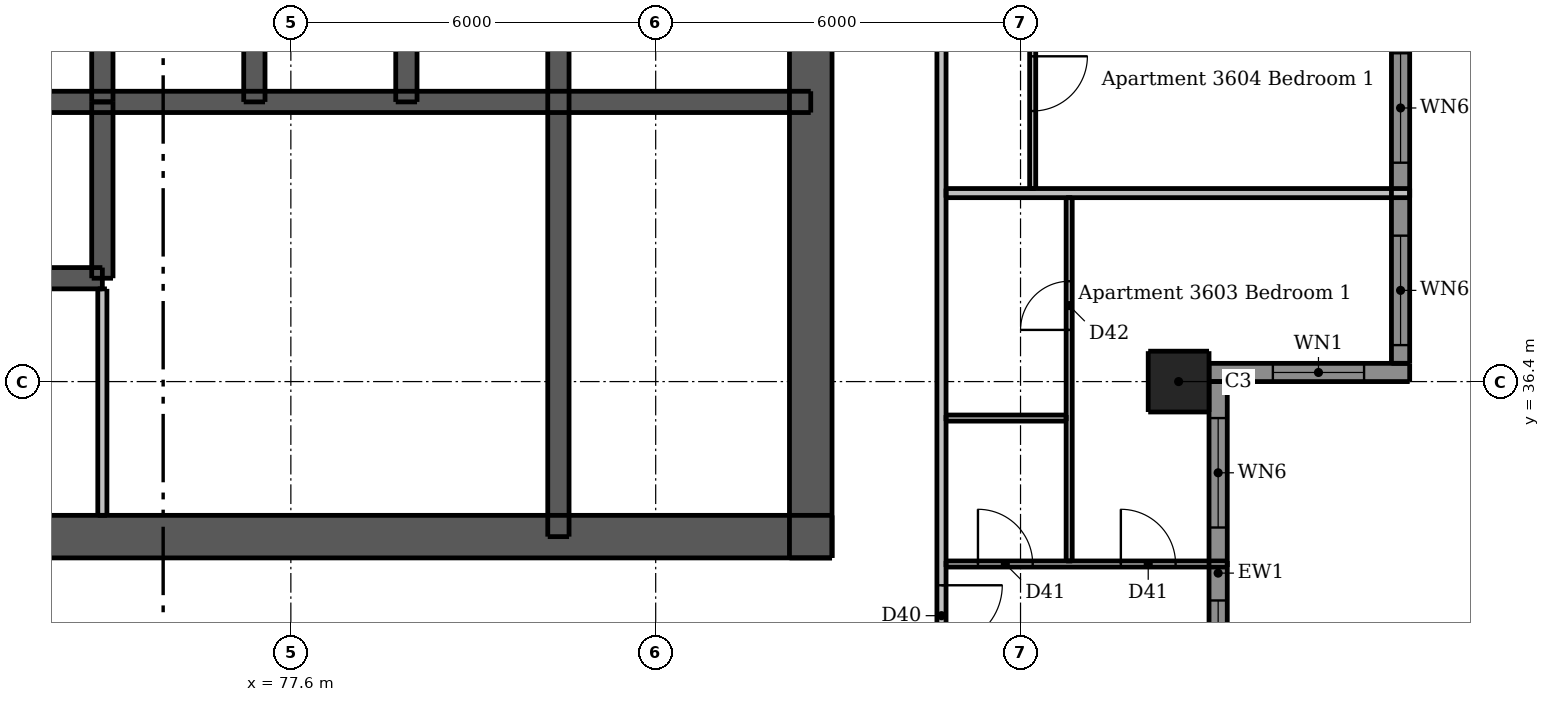
"""IFC4 building model, lengths in metres.
Left out: names, types, materials, properties, quantities, classifications, styles, units other than length and angle.
Written with IfcOpenShell. Run it as: python <this file> out.ifc"""

import sys

from ifc_helpers import new_model, si_unit, direction, frame, frame_2d, origin, origin_2d, place, context, subcontext, project, spatial, rectangle, extrude, element, fill, save


model = new_model("IFC4")
c1 = context("Model", 3, precision=1e-05, world=origin(), true_north=direction((0.0, 1.0)))
c2 = subcontext(c1, "Body", "Model", "MODEL_VIEW")
j1 = project(units=[si_unit("LENGTHUNIT", "METRE"), si_unit("PLANEANGLEUNIT", "RADIAN")], contexts=[c1])
p1 = place(None, origin())
s1 = spatial("IfcSite", under=j1, at=p1, CompositionType="ELEMENT")
p2 = place(p1, origin())
s2 = spatial("IfcBuilding", under=s1, at=p2, CompositionType="ELEMENT")
p3 = place(p2, frame((0.0, 0.0, 137.2)))
s3 = spatial("IfcBuildingStorey", under=s2, at=p3, CompositionType="ELEMENT", Elevation=137.2)
p4 = place(p3, frame((62.5, 33.85, 0.0), z_axis=(0.0, 0.0, 1.0), x_axis=(1.0, 0.0, 0.0)))
e1 = element("IfcWall", 1, at=p4, inside=s3, PredefinedType="SHEAR", context=c2, shape_type="SweptSolid", body=[
    extrude(rectangle(XDim=24.0, YDim=0.7, at=frame_2d((12.0, 0.0))), origin(), (0.0, 0.0, 1.0), 3.05),
])
p5 = place(p4, frame((1.962, 0.0, 0.0)))
e2 = element("IfcOpeningElement", 2, at=p5, cuts=e1, PredefinedType="OPENING", context=c2, shape_type="SweptSolid", body=[
    extrude(rectangle(XDim=1.1, YDim=2.1, at=frame_2d((0.55, 1.05))), frame((0.0, 0.36, 0.0), z_axis=(0.0, -1.0, 0.0), x_axis=(1.0, 0.0, 0.0)), (0.0, 0.0, 1.0), 0.72),
])
p6 = place(p4, frame((20.938, 0.0, 0.0)))
e3 = element("IfcOpeningElement", 3, at=p6, cuts=e1, PredefinedType="OPENING", context=c2, shape_type="SweptSolid", body=[
    extrude(rectangle(XDim=1.1, YDim=2.1, at=frame_2d((0.55, 1.05))), frame((0.0, 0.36, 0.0), z_axis=(0.0, -1.0, 0.0), x_axis=(1.0, 0.0, 0.0)), (0.0, 0.0, 1.0), 0.72),
])
p7 = place(p4, frame((8.0, 0.0, 0.0)))
e4 = element("IfcOpeningElement", 4, at=p7, cuts=e1, PredefinedType="OPENING", context=c2, shape_type="SweptSolid", body=[
    extrude(rectangle(XDim=1.1, YDim=2.1, at=frame_2d((0.55, 1.05))), frame((0.0, 0.36, 0.0), z_axis=(0.0, -1.0, 0.0), x_axis=(1.0, 0.0, 0.0)), (0.0, 0.0, 1.0), 0.72),
])
p8 = place(p4, frame((15.3, 0.0, 0.0)))
e5 = element("IfcOpeningElement", 5, at=p8, cuts=e1, PredefinedType="OPENING", context=c2, shape_type="SweptSolid", body=[
    extrude(rectangle(XDim=0.9, YDim=2.1, at=frame_2d((0.45, 1.05))), frame((0.0, 0.36, 0.0), z_axis=(0.0, -1.0, 0.0), x_axis=(1.0, 0.0, 0.0)), (0.0, 0.0, 1.0), 0.72),
])
p9 = place(p3, frame((86.15, 33.5, 0.0), z_axis=(0.0, 0.0, 1.0), x_axis=(0.0, 1.0, 0.0)))
e6 = element("IfcWall", 6, at=p9, inside=s3, PredefinedType="SHEAR", context=c2, shape_type="SweptSolid", body=[
    extrude(rectangle(XDim=24.0, YDim=0.7, at=frame_2d((12.0, 0.0))), origin(), (0.0, 0.0, 1.0), 3.05),
])
p10 = place(p9, frame((11.2, 0.0, 0.0)))
e7 = element("IfcOpeningElement", 7, at=p10, cuts=e6, PredefinedType="OPENING", context=c2, shape_type="SweptSolid", body=[
    extrude(rectangle(XDim=1.6, YDim=2.1, at=frame_2d((0.8, 1.05))), frame((0.0, 0.36, 0.0), z_axis=(0.0, -1.0, 0.0), x_axis=(1.0, 0.0, 0.0)), (0.0, 0.0, 1.0), 0.72),
])
p11 = place(p3, frame((62.85, 41.0, 0.0), z_axis=(0.0, 0.0, 1.0), x_axis=(1.0, 0.0, 0.0)))
e8 = element("IfcWall", 8, at=p11, inside=s3, PredefinedType="SHEAR", context=c2, shape_type="SweptSolid", body=[
    extrude(rectangle(XDim=23.3, YDim=0.35, at=frame_2d((11.65, 0.0))), origin(), (0.0, 0.0, 1.0), 3.05),
])
p12 = place(p3, frame((82.0, 33.85, 0.0), z_axis=(0.0, 0.0, 1.0), x_axis=(0.0, 1.0, 0.0)))
e9 = element("IfcWall", 9, at=p12, inside=s3, PredefinedType="SHEAR", context=c2, shape_type="SweptSolid", body=[
    extrude(rectangle(XDim=10.05, YDim=0.35, at=frame_2d((5.025, 0.0))), origin(), (0.0, 0.0, 1.0), 3.05),
])
for number, where, z_axis, x_axis in (
    (10, (74.5, 41.0, 0.0), (0.0, 0.0, 1.0), (0.0, 1.0, 0.0)),
    (11, (77.0, 41.0, 0.0), (0.0, 0.0, 1.0), (0.0, 1.0, 0.0)),
    (12, (79.5, 41.0, 0.0), (0.0, 0.0, 1.0), (0.0, 1.0, 0.0)),
):
    element("IfcWall", number, at=place(p3, frame(where, z_axis=z_axis, x_axis=x_axis)), inside=s3, PredefinedType="SHEAR", context=c2, shape_type="SweptSolid", body=[
        extrude(rectangle(XDim=2.9, YDim=0.35, at=frame_2d((1.45, 0.0))), origin(), (0.0, 0.0, 1.0), 3.05),
    ])
p13 = place(p3, frame((67.0, 38.1, 0.0), z_axis=(0.0, 0.0, 1.0), x_axis=(1.0, 0.0, 0.0)))
e13 = element("IfcWall", 13, at=p13, inside=s3, PredefinedType="SHEAR", context=c2, shape_type="SweptSolid", body=[
    extrude(rectangle(XDim=7.5, YDim=0.35, at=frame_2d((3.75, 0.0))), origin(), (0.0, 0.0, 1.0), 3.05),
])
p14 = place(p13, frame((0.7, 0.0, 0.0)))
e14 = element("IfcOpeningElement", 14, at=p14, cuts=e13, PredefinedType="OPENING", context=c2, shape_type="SweptSolid", body=[
    extrude(rectangle(XDim=1.1, YDim=2.1, at=frame_2d((0.55, 1.05))), frame((0.0, 0.185, 0.0), z_axis=(0.0, -1.0, 0.0), x_axis=(1.0, 0.0, 0.0)), (0.0, 0.0, 1.0), 0.37),
])
p15 = place(p13, frame((3.2, 0.0, 0.0)))
e15 = element("IfcOpeningElement", 15, at=p15, cuts=e13, PredefinedType="OPENING", context=c2, shape_type="SweptSolid", body=[
    extrude(rectangle(XDim=1.1, YDim=2.1, at=frame_2d((0.55, 1.05))), frame((0.0, 0.185, 0.0), z_axis=(0.0, -1.0, 0.0), x_axis=(1.0, 0.0, 0.0)), (0.0, 0.0, 1.0), 0.37),
])
p16 = place(p13, frame((5.65, 0.0, 0.0)))
e16 = element("IfcOpeningElement", 16, at=p16, cuts=e13, PredefinedType="OPENING", context=c2, shape_type="SweptSolid", body=[
    extrude(rectangle(XDim=1.2, YDim=2.1, at=frame_2d((0.6, 1.05))), frame((0.0, 0.185, 0.0), z_axis=(0.0, -1.0, 0.0), x_axis=(1.0, 0.0, 0.0)), (0.0, 0.0, 1.0), 0.37),
])
p17 = place(p3, frame((74.5, 38.1, 0.0), z_axis=(0.0, 0.0, 1.0), x_axis=(0.0, 1.0, 0.0)))
e17 = element("IfcWall", 17, at=p17, inside=s3, PredefinedType="SHEAR", context=c2, shape_type="SweptSolid", body=[
    extrude(rectangle(XDim=2.9, YDim=0.35, at=frame_2d((1.45, 0.0))), origin(), (0.0, 0.0, 1.0), 3.05),
])
p18 = place(p3, frame((92.2, 36.4, 0.0), z_axis=(0.0, 0.0, 1.0), x_axis=(1.0, 0.0, 0.0)))
e18 = element("IfcColumn", 18, at=p18, inside=s3, PredefinedType="COLUMN", context=c2, shape_type="SweptSolid", body=[
    extrude(rectangle(XDim=1.0, YDim=1.0, at=origin_2d()), origin(), (0.0, 0.0, 1.0), 3.05),
])
p19 = place(p3, frame((92.7, 36.55, 0.0), z_axis=(0.0, 0.0, 1.0), x_axis=(1.0, 0.0, 0.0)))
e19 = element("IfcWall", 19, at=p19, inside=s3, PredefinedType="SOLIDWALL", context=c2, shape_type="SweptSolid", body=[
    extrude(rectangle(XDim=3.3, YDim=0.3, at=frame_2d((1.65, 0.0))), origin(), (0.0, 0.0, 1.0), 3.05),
])
p20 = place(p19, frame((1.05, 0.0, 0.9)))
e20 = element("IfcOpeningElement", 20, at=p20, cuts=e19, PredefinedType="OPENING", context=c2, shape_type="SweptSolid", body=[
    extrude(rectangle(XDim=1.5, YDim=1.5, at=frame_2d((0.75, 0.75))), frame((0.0, 0.16, 0.0), z_axis=(0.0, -1.0, 0.0), x_axis=(1.0, 0.0, 0.0)), (0.0, 0.0, 1.0), 0.32),
])
p21 = place(p3, frame((92.85, 30.1, 0.0), z_axis=(0.0, 0.0, 1.0), x_axis=(0.0, 1.0, 0.0)))
e21 = element("IfcWall", 21, at=p21, inside=s3, PredefinedType="SOLIDWALL", context=c2, shape_type="SweptSolid", body=[
    extrude(rectangle(XDim=6.3, YDim=0.3, at=frame_2d((3.15, 0.0))), origin(), (0.0, 0.0, 1.0), 3.05),
])
p22 = place(p21, frame((0.9, 0.0, 0.15)))
e22 = element("IfcOpeningElement", 22, at=p22, cuts=e21, PredefinedType="OPENING", context=c2, shape_type="SweptSolid", body=[
    extrude(rectangle(XDim=1.8, YDim=2.1, at=frame_2d((0.9, 1.05))), frame((0.0, 0.16, 0.0), z_axis=(0.0, -1.0, 0.0), x_axis=(1.0, 0.0, 0.0)), (0.0, 0.0, 1.0), 0.32),
])
p23 = place(p21, frame((3.9, 0.0, 0.15)))
e23 = element("IfcOpeningElement", 23, at=p23, cuts=e21, PredefinedType="OPENING", context=c2, shape_type="SweptSolid", body=[
    extrude(rectangle(XDim=1.8, YDim=2.1, at=frame_2d((0.9, 1.05))), frame((0.0, 0.16, 0.0), z_axis=(0.0, -1.0, 0.0), x_axis=(1.0, 0.0, 0.0)), (0.0, 0.0, 1.0), 0.32),
])
p24 = place(p3, frame((95.85, 36.7, 0.0), z_axis=(0.0, 0.0, 1.0), x_axis=(0.0, 1.0, 0.0)))
e24 = element("IfcWall", 24, at=p24, inside=s3, PredefinedType="SOLIDWALL", context=c2, shape_type="SweptSolid", body=[
    extrude(rectangle(XDim=5.7, YDim=0.3, at=frame_2d((2.85, 0.0))), origin(), (0.0, 0.0, 1.0), 3.05),
])
p25 = place(p24, frame((0.3, 0.0, 0.15)))
e25 = element("IfcOpeningElement", 25, at=p25, cuts=e24, PredefinedType="OPENING", context=c2, shape_type="SweptSolid", body=[
    extrude(rectangle(XDim=1.8, YDim=2.1, at=frame_2d((0.9, 1.05))), frame((0.0, 0.16, 0.0), z_axis=(0.0, -1.0, 0.0), x_axis=(1.0, 0.0, 0.0)), (0.0, 0.0, 1.0), 0.32),
])
p26 = place(p24, frame((3.3, 0.0, 0.15)))
e26 = element("IfcOpeningElement", 26, at=p26, cuts=e24, PredefinedType="OPENING", context=c2, shape_type="SweptSolid", body=[
    extrude(rectangle(XDim=1.8, YDim=2.1, at=frame_2d((0.9, 1.05))), frame((0.0, 0.16, 0.0), z_axis=(0.0, -1.0, 0.0), x_axis=(1.0, 0.0, 0.0)), (0.0, 0.0, 1.0), 0.32),
])
p27 = place(p3, frame((74.5, 34.2, 0.0), z_axis=(0.0, 0.0, 1.0), x_axis=(0.0, 1.0, 0.0)))
e27 = element("IfcWall", 27, at=p27, inside=s3, PredefinedType="PLUMBINGWALL", context=c2, shape_type="SweptSolid", body=[
    extrude(rectangle(XDim=3.725, YDim=0.15, at=frame_2d((1.863, 0.0))), origin(), (0.0, 0.0, 1.0), 3.05),
])
p28 = place(p3, frame((89.8, 59.35, 0.0), z_axis=(0.0, 0.0, 1.0), x_axis=(0.0, -1.0, 0.0)))
e28 = element("IfcWall", 28, at=p28, inside=s3, PredefinedType="PARTITIONING", context=c2, shape_type="SweptSolid", body=[
    extrude(rectangle(XDim=19.775, YDim=0.1, at=frame_2d((9.888, 0.0))), origin(), (0.0, 0.0, 1.0), 3.05),
])
p29 = place(p28, frame((2.7, 0.0, 0.0)))
e29 = element("IfcOpeningElement", 29, at=p29, cuts=e28, PredefinedType="OPENING", context=c2, shape_type="SweptSolid", body=[
    extrude(rectangle(XDim=0.9, YDim=2.1, at=frame_2d((0.45, 1.05))), frame((0.0, 0.06, 0.0), z_axis=(0.0, -1.0, 0.0), x_axis=(1.0, 0.0, 0.0)), (0.0, 0.0, 1.0), 0.12),
])
p30 = place(p28, frame((17.6, 0.0, 0.0)))
e30 = element("IfcOpeningElement", 30, at=p30, cuts=e28, PredefinedType="OPENING", context=c2, shape_type="SweptSolid", body=[
    extrude(rectangle(XDim=0.9, YDim=2.1, at=frame_2d((0.45, 1.05))), frame((0.0, 0.06, 0.0), z_axis=(0.0, -1.0, 0.0), x_axis=(1.0, 0.0, 0.0)), (0.0, 0.0, 1.0), 0.12),
])
p31 = place(p28, frame((10.15, 0.0, 0.0)))
e31 = element("IfcOpeningElement", 31, at=p31, cuts=e28, PredefinedType="OPENING", context=c2, shape_type="SweptSolid", body=[
    extrude(rectangle(XDim=0.9, YDim=2.1, at=frame_2d((0.45, 1.05))), frame((0.0, 0.06, 0.0), z_axis=(0.0, -1.0, 0.0), x_axis=(1.0, 0.0, 0.0)), (0.0, 0.0, 1.0), 0.12),
])
p32 = place(p28, frame((14.65, 0.0, 0.0)))
e32 = element("IfcOpeningElement", 32, at=p32, cuts=e28, PredefinedType="OPENING", context=c2, shape_type="SweptSolid", body=[
    extrude(rectangle(XDim=0.8, YDim=2.1, at=frame_2d((0.4, 1.05))), frame((0.0, 0.06, 0.0), z_axis=(0.0, -1.0, 0.0), x_axis=(1.0, 0.0, 0.0)), (0.0, 0.0, 1.0), 0.12),
])
p33 = place(p28, frame((5.75, 0.0, 0.0)))
e33 = element("IfcOpeningElement", 33, at=p33, cuts=e28, PredefinedType="OPENING", context=c2, shape_type="SweptSolid", body=[
    extrude(rectangle(XDim=0.8, YDim=2.1, at=frame_2d((0.4, 1.05))), frame((0.0, 0.06, 0.0), z_axis=(0.0, -1.0, 0.0), x_axis=(1.0, 0.0, 0.0)), (0.0, 0.0, 1.0), 0.12),
])
p34 = place(p3, frame((90.4, 33.45, 0.0), z_axis=(0.0, 0.0, 1.0), x_axis=(0.0, 1.0, 0.0)))
e34 = element("IfcWall", 34, at=p34, inside=s3, PredefinedType="PARTITIONING", context=c2, shape_type="SweptSolid", body=[
    extrude(rectangle(XDim=5.975, YDim=0.1, at=frame_2d((2.988, 0.0))), origin(), (0.0, 0.0, 1.0), 3.05),
])
p35 = place(p34, frame((3.8, 0.0, 0.0)))
e35 = element("IfcOpeningElement", 35, at=p35, cuts=e34, PredefinedType="OPENING", context=c2, shape_type="SweptSolid", body=[
    extrude(rectangle(XDim=0.8, YDim=2.1, at=frame_2d((0.4, 1.05))), frame((0.0, 0.06, 0.0), z_axis=(0.0, -1.0, 0.0), x_axis=(1.0, 0.0, 0.0)), (0.0, 0.0, 1.0), 0.12),
])
p36 = place(p3, frame((88.375, 35.8, 0.0), z_axis=(0.0, 0.0, 1.0), x_axis=(1.0, 0.0, 0.0)))
e36 = element("IfcWall", 36, at=p36, inside=s3, PredefinedType="PARTITIONING", context=c2, shape_type="SweptSolid", body=[
    extrude(rectangle(XDim=1.975, YDim=0.1, at=frame_2d((0.988, 0.0))), origin(), (0.0, 0.0, 1.0), 3.05),
])
p37 = place(p3, frame((88.375, 33.4, 0.0), z_axis=(0.0, 0.0, 1.0), x_axis=(1.0, 0.0, 0.0)))
e37 = element("IfcWall", 37, at=p37, inside=s3, PredefinedType="PARTITIONING", context=c2, shape_type="SweptSolid", body=[
    extrude(rectangle(XDim=4.625, YDim=0.1, at=frame_2d((2.312, 0.0))), origin(), (0.0, 0.0, 1.0), 3.05),
])
p38 = place(p37, frame((0.525, 0.0, 0.0)))
e38 = element("IfcOpeningElement", 38, at=p38, cuts=e37, PredefinedType="OPENING", context=c2, shape_type="SweptSolid", body=[
    extrude(rectangle(XDim=0.9, YDim=2.1, at=frame_2d((0.45, 1.05))), frame((0.0, 0.06, 0.0), z_axis=(0.0, -1.0, 0.0), x_axis=(1.0, 0.0, 0.0)), (0.0, 0.0, 1.0), 0.12),
])
p39 = place(p37, frame((2.875, 0.0, 0.0)))
e39 = element("IfcOpeningElement", 39, at=p39, cuts=e37, PredefinedType="OPENING", context=c2, shape_type="SweptSolid", body=[
    extrude(rectangle(XDim=0.9, YDim=2.1, at=frame_2d((0.45, 1.05))), frame((0.0, 0.06, 0.0), z_axis=(0.0, -1.0, 0.0), x_axis=(1.0, 0.0, 0.0)), (0.0, 0.0, 1.0), 0.12),
])
p40 = place(p3, frame((88.3, 60.475, 0.0), z_axis=(0.0, 0.0, 1.0), x_axis=(0.0, -1.0, 0.0)))
e40 = element("IfcWall", 40, at=p40, inside=s3, PredefinedType="PARTITIONING", context=c2, shape_type="SweptSolid", body=[
    extrude(rectangle(XDim=28.7, YDim=0.15, at=frame_2d((14.35, 0.0))), origin(), (0.0, 0.0, 1.0), 3.05),
])
p41 = place(p40, frame((27.425, 0.0, 0.0)))
e41 = element("IfcOpeningElement", 41, at=p41, cuts=e40, PredefinedType="OPENING", context=c2, shape_type="SweptSolid", body=[
    extrude(rectangle(XDim=1.0, YDim=2.1, at=frame_2d((0.5, 1.05))), frame((0.0, 0.085, 0.0), z_axis=(0.0, -1.0, 0.0), x_axis=(1.0, 0.0, 0.0)), (0.0, 0.0, 1.0), 0.17),
])
p42 = place(p40, frame((10.575, 0.0, 0.0)))
e42 = element("IfcOpeningElement", 42, at=p42, cuts=e40, PredefinedType="OPENING", context=c2, shape_type="SweptSolid", body=[
    extrude(rectangle(XDim=1.0, YDim=2.1, at=frame_2d((0.5, 1.05))), frame((0.0, 0.085, 0.0), z_axis=(0.0, -1.0, 0.0), x_axis=(1.0, 0.0, 0.0)), (0.0, 0.0, 1.0), 0.17),
])
p43 = place(p3, frame((88.375, 39.5, 0.0), z_axis=(0.0, 0.0, 1.0), x_axis=(1.0, 0.0, 0.0)))
e43 = element("IfcWall", 43, at=p43, inside=s3, PredefinedType="PARTITIONING", context=c2, shape_type="SweptSolid", body=[
    extrude(rectangle(XDim=7.625, YDim=0.15, at=frame_2d((3.812, 0.0))), origin(), (0.0, 0.0, 1.0), 3.05),
])
p44 = place(p20, origin())
e44 = element("IfcWindow", 44, at=p44, inside=s3, PartitioningType="DOUBLE_PANEL_VERTICAL", PredefinedType="WINDOW", context=c2, shape_type="SweptSolid", body=[
    extrude(rectangle(XDim=1.5, YDim=1.5, at=frame_2d((0.75, 0.75))), frame((0.0, 0.03, 0.0), z_axis=(0.0, -1.0, 0.0), x_axis=(1.0, 0.0, 0.0)), (0.0, 0.0, 1.0), 0.06),
])
fill(e20, e44)
p45 = place(p22, origin())
e45 = element("IfcWindow", 45, at=p45, inside=s3, PartitioningType="DOUBLE_PANEL_VERTICAL", PredefinedType="WINDOW", context=c2, shape_type="SweptSolid", body=[
    extrude(rectangle(XDim=1.8, YDim=2.1, at=frame_2d((0.9, 1.05))), frame((0.0, 0.03, 0.0), z_axis=(0.0, -1.0, 0.0), x_axis=(1.0, 0.0, 0.0)), (0.0, 0.0, 1.0), 0.06),
])
fill(e22, e45)
p46 = place(p23, origin())
e46 = element("IfcWindow", 46, at=p46, inside=s3, PartitioningType="DOUBLE_PANEL_VERTICAL", PredefinedType="WINDOW", context=c2, shape_type="SweptSolid", body=[
    extrude(rectangle(XDim=1.8, YDim=2.1, at=frame_2d((0.9, 1.05))), frame((0.0, 0.03, 0.0), z_axis=(0.0, -1.0, 0.0), x_axis=(1.0, 0.0, 0.0)), (0.0, 0.0, 1.0), 0.06),
])
fill(e23, e46)
p47 = place(p25, origin())
e47 = element("IfcWindow", 47, at=p47, inside=s3, PartitioningType="DOUBLE_PANEL_VERTICAL", PredefinedType="WINDOW", context=c2, shape_type="SweptSolid", body=[
    extrude(rectangle(XDim=1.8, YDim=2.1, at=frame_2d((0.9, 1.05))), frame((0.0, 0.03, 0.0), z_axis=(0.0, -1.0, 0.0), x_axis=(1.0, 0.0, 0.0)), (0.0, 0.0, 1.0), 0.06),
])
fill(e25, e47)
p48 = place(p26, origin())
e48 = element("IfcWindow", 48, at=p48, inside=s3, PartitioningType="DOUBLE_PANEL_VERTICAL", PredefinedType="WINDOW", context=c2, shape_type="SweptSolid", body=[
    extrude(rectangle(XDim=1.8, YDim=2.1, at=frame_2d((0.9, 1.05))), frame((0.0, 0.03, 0.0), z_axis=(0.0, -1.0, 0.0), x_axis=(1.0, 0.0, 0.0)), (0.0, 0.0, 1.0), 0.06),
])
fill(e26, e48)
p49 = place(p6, origin())
e49 = element("IfcDoor", 49, at=p49, inside=s3, OperationType="SINGLE_SWING_RIGHT", PredefinedType="DOOR", context=c2, shape_type="SweptSolid", body=[
    extrude(rectangle(XDim=1.1, YDim=2.1, at=frame_2d((0.55, 1.05))), frame((0.0, 0.337, 0.0), z_axis=(0.0, -1.0, 0.0), x_axis=(1.0, 0.0, 0.0)), (0.0, 0.0, 1.0), 0.05),
])
fill(e3, e49)
p50 = place(p8, origin())
e50 = element("IfcDoor", 50, at=p50, inside=s3, OperationType="SINGLE_SWING_LEFT", PredefinedType="DOOR", context=c2, shape_type="SweptSolid", body=[
    extrude(rectangle(XDim=0.9, YDim=2.1, at=frame_2d((0.45, 1.05))), frame((0.0, 0.337, 0.0), z_axis=(0.0, -1.0, 0.0), x_axis=(1.0, 0.0, 0.0)), (0.0, 0.0, 1.0), 0.05),
])
fill(e5, e50)
p51 = place(p16, origin())
e51 = element("IfcDoor", 51, at=p51, inside=s3, OperationType="DOUBLE_DOOR_SLIDING", PredefinedType="DOOR", context=c2, shape_type="SweptSolid", body=[
    extrude(rectangle(XDim=1.2, YDim=2.1, at=frame_2d((0.6, 1.05))), frame((0.0, 0.025, 0.0), z_axis=(0.0, -1.0, 0.0), x_axis=(1.0, 0.0, 0.0)), (0.0, 0.0, 1.0), 0.05),
])
fill(e16, e51)
p52 = place(p41, origin())
e52 = element("IfcDoor", 52, at=p52, inside=s3, OperationType="SINGLE_SWING_LEFT", PredefinedType="DOOR", context=c2, shape_type="SweptSolid", body=[
    extrude(rectangle(XDim=1.0, YDim=2.1, at=frame_2d((0.5, 1.05))), frame((0.0, 0.025, 0.0), z_axis=(0.0, -1.0, 0.0), x_axis=(1.0, 0.0, 0.0)), (0.0, 0.0, 1.0), 0.05),
])
fill(e41, e52)
p53 = place(p38, origin())
e53 = element("IfcDoor", 53, at=p53, inside=s3, OperationType="SINGLE_SWING_LEFT", PredefinedType="DOOR", context=c2, shape_type="SweptSolid", body=[
    extrude(rectangle(XDim=0.9, YDim=2.1, at=frame_2d((0.45, 1.05))), frame((0.0, 0.025, 0.0), z_axis=(0.0, -1.0, 0.0), x_axis=(1.0, 0.0, 0.0)), (0.0, 0.0, 1.0), 0.05),
])
fill(e38, e53)
p54 = place(p39, origin())
e54 = element("IfcDoor", 54, at=p54, inside=s3, OperationType="SINGLE_SWING_LEFT", PredefinedType="DOOR", context=c2, shape_type="SweptSolid", body=[
    extrude(rectangle(XDim=0.9, YDim=2.1, at=frame_2d((0.45, 1.05))), frame((0.0, 0.025, 0.0), z_axis=(0.0, -1.0, 0.0), x_axis=(1.0, 0.0, 0.0)), (0.0, 0.0, 1.0), 0.05),
])
fill(e39, e54)
p55 = place(p35, origin())
e55 = element("IfcDoor", 55, at=p55, inside=s3, OperationType="SINGLE_SWING_LEFT", PredefinedType="DOOR", context=c2, shape_type="SweptSolid", body=[
    extrude(rectangle(XDim=0.8, YDim=2.1, at=frame_2d((0.4, 1.05))), frame((0.0, 0.025, 0.0), z_axis=(0.0, -1.0, 0.0), x_axis=(1.0, 0.0, 0.0)), (0.0, 0.0, 1.0), 0.05),
])
fill(e35, e55)
p56 = place(p30, origin())
e56 = element("IfcDoor", 56, at=p56, inside=s3, OperationType="SINGLE_SWING_LEFT", PredefinedType="DOOR", context=c2, shape_type="SweptSolid", body=[
    extrude(rectangle(XDim=0.9, YDim=2.1, at=frame_2d((0.45, 1.05))), frame((0.0, 0.025, 0.0), z_axis=(0.0, -1.0, 0.0), x_axis=(1.0, 0.0, 0.0)), (0.0, 0.0, 1.0), 0.05),
])
fill(e30, e56)
save(model, sys.argv[1])
